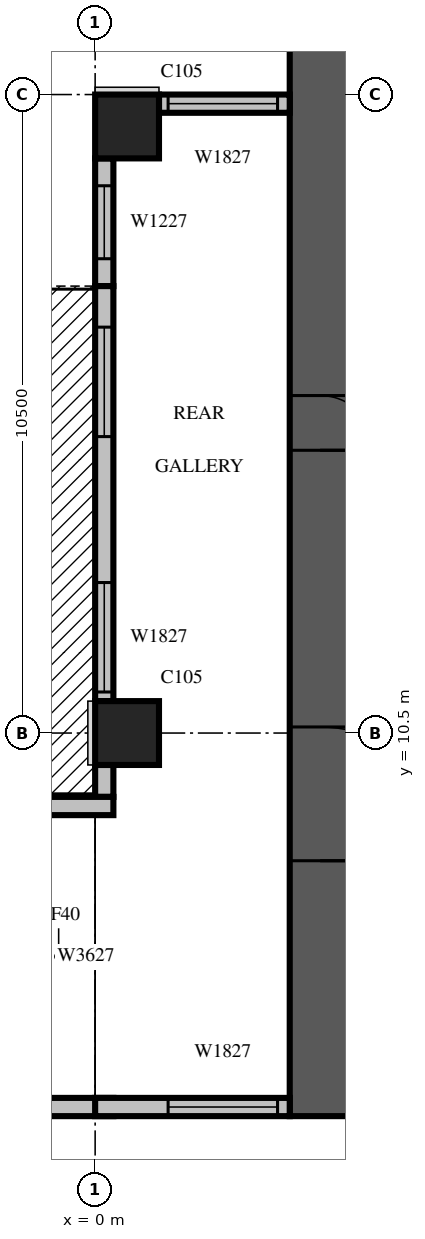
"""IFC4 building model, lengths in metres.
Left out: names, types, materials, properties, quantities, classifications, styles, units other than length and angle.
Written with IfcOpenShell. Run it as: python <this file> out.ifc"""

import sys

from ifc_helpers import new_model, si_unit, direction, frame, frame_2d, origin, origin_2d, place, context, subcontext, project, spatial, rectangle, extrude, source, transform, mapped, element, fill, save


model = new_model("IFC4")
c1 = context("Model", 3, precision=1e-05, world=origin(), true_north=direction((0.0, 1.0)))
c2 = subcontext(c1, "Body", "Model", "MODEL_VIEW")
j1 = project(units=[si_unit("LENGTHUNIT", "METRE"), si_unit("PLANEANGLEUNIT", "RADIAN")], contexts=[c1])
p1 = place(None, origin())
s1 = spatial("IfcSite", under=j1, at=p1, CompositionType="ELEMENT")
p2 = place(p1, origin())
s2 = spatial("IfcBuilding", under=s1, at=p2, CompositionType="ELEMENT")
p3 = place(p2, frame((0.0, 0.0, 128.7)))
s3 = spatial("IfcBuildingStorey", under=s2, at=p3, CompositionType="ELEMENT", Elevation=128.7)
m1 = source(origin(), c2, "Body", "SweptSolid", [
    extrude(rectangle(XDim=1.05, YDim=1.05, at=origin_2d()), origin(), (0.0, 0.0, 1.0), 4.2),
])
for number, where, z_axis, x_axis in (
    (1, (0.525, 10.5, 0.0), (0.0, 0.0, 1.0), (1.0, 0.0, 0.0)),
    (2, (0.525, 20.475, 0.0), (0.0, 0.0, 1.0), (1.0, 0.0, 0.0)),
):
    element("IfcColumn", number, at=place(p3, frame(where, z_axis=z_axis, x_axis=x_axis)), inside=s3, PredefinedType="COLUMN", context=c2, shape_type="MappedRepresentation", body=[
        mapped(m1, transform((0.0, 0.0, 0.0), scale=1.0)),
    ])
m2 = source(origin(), c2, "Body", "SweptSolid", [
    extrude(rectangle(XDim=17.8, YDim=1.0, at=frame_2d((8.9, 0.0))), origin(), (0.0, 0.0, 1.0), 4.2),
])
p4 = place(p3, frame((3.7, 4.2, 0.0), z_axis=(0.0, 0.0, 1.0), x_axis=(0.0, 1.0, 0.0)))
e3 = element("IfcWall", 3, at=p4, inside=s3, PredefinedType="SHEAR", context=c2, shape_type="MappedRepresentation", body=[
    mapped(m2, transform((0.0, 0.0, 0.0), scale=1.0)),
])
m3 = source(origin(), c2, "Body", "SweptSolid", [
    extrude(rectangle(XDim=2.2, YDim=2.1, at=frame_2d((1.1, 1.05))), frame((0.0, 0.51, 0.0), z_axis=(0.0, -1.0, 0.0), x_axis=(1.0, 0.0, 0.0)), (0.0, 0.0, 1.0), 1.02),
])
p5 = place(p4, frame((4.2, 0.0, 0.0)))
e4 = element("IfcOpeningElement", 4, at=p5, cuts=e3, PredefinedType="OPENING", context=c2, shape_type="MappedRepresentation", body=[
    mapped(m3, transform((0.0, 0.0, 0.0), scale=1.0)),
])
m4 = source(origin(), c2, "Body", "SweptSolid", [
    extrude(rectangle(XDim=0.9, YDim=2.1, at=frame_2d((0.45, 1.05))), frame((0.0, 0.51, 0.0), z_axis=(0.0, -1.0, 0.0), x_axis=(1.0, 0.0, 0.0)), (0.0, 0.0, 1.0), 1.02),
])
p6 = place(p4, frame((10.95, 0.0, 0.0)))
e5 = element("IfcOpeningElement", 5, at=p6, cuts=e3, PredefinedType="OPENING", context=c2, shape_type="MappedRepresentation", body=[
    mapped(m4, transform((0.0, 0.0, 0.0), scale=1.0)),
])
m5 = source(origin(), c2, "Body", "SweptSolid", [
    extrude(rectangle(XDim=2.15, YDim=0.3, at=frame_2d((1.075, 0.0))), origin(), (0.0, 0.0, 1.0), 3.8),
])
p7 = place(p3, frame((3.2, 20.85, 0.0), z_axis=(0.0, 0.0, 1.0), x_axis=(-1.0, 0.0, 0.0)))
e6 = element("IfcWall", 6, at=p7, inside=s3, PredefinedType="STANDARD", context=c2, shape_type="MappedRepresentation", body=[
    mapped(m5, transform((0.0, 0.0, 0.0), scale=1.0)),
])
m6 = source(origin(), c2, "Body", "SweptSolid", [
    extrude(rectangle(XDim=1.8, YDim=2.7, at=frame_2d((0.9, 1.35))), frame((0.0, 0.16, 0.0), z_axis=(0.0, -1.0, 0.0), x_axis=(1.0, 0.0, 0.0)), (0.0, 0.0, 1.0), 0.32),
])
p8 = place(p7, frame((0.2, 0.0, 0.6)))
e7 = element("IfcOpeningElement", 7, at=p8, cuts=e6, PredefinedType="OPENING", context=c2, shape_type="MappedRepresentation", body=[
    mapped(m6, transform((0.0, 0.0, 0.0), scale=1.0)),
])
m7 = source(origin(), c2, "Body", "SweptSolid", [
    extrude(rectangle(XDim=2.1, YDim=0.3, at=frame_2d((1.05, 0.0))), origin(), (0.0, 0.0, 1.0), 3.8),
])
p9 = place(p3, frame((0.15, 19.95, 0.0), z_axis=(0.0, 0.0, 1.0), x_axis=(0.0, -1.0, 0.0)))
e8 = element("IfcWall", 8, at=p9, inside=s3, PredefinedType="STANDARD", context=c2, shape_type="MappedRepresentation", body=[
    mapped(m7, transform((0.0, 0.0, 0.0), scale=1.0)),
])
m8 = source(origin(), c2, "Body", "SweptSolid", [
    extrude(rectangle(XDim=1.2, YDim=2.7, at=frame_2d((0.6, 1.35))), frame((0.0, 0.16, 0.0), z_axis=(0.0, -1.0, 0.0), x_axis=(1.0, 0.0, 0.0)), (0.0, 0.0, 1.0), 0.32),
])
p10 = place(p9, frame((0.45, 0.0, 0.6)))
e9 = element("IfcOpeningElement", 9, at=p10, cuts=e8, PredefinedType="OPENING", context=c2, shape_type="MappedRepresentation", body=[
    mapped(m8, transform((0.0, 0.0, 0.0), scale=1.0)),
])
m9 = source(origin(), c2, "Body", "SweptSolid", [
    extrude(rectangle(XDim=6.825, YDim=0.3, at=frame_2d((3.413, 0.0))), origin(), (0.0, 0.0, 1.0), 3.8),
])
p11 = place(p3, frame((0.15, 17.85, 0.0), z_axis=(0.0, 0.0, 1.0), x_axis=(0.0, -1.0, 0.0)))
e10 = element("IfcWall", 10, at=p11, inside=s3, PredefinedType="STANDARD", context=c2, shape_type="MappedRepresentation", body=[
    mapped(m9, transform((0.0, 0.0, 0.0), scale=1.0)),
])
m10 = source(origin(), c2, "Body", "SweptSolid", [
    extrude(rectangle(XDim=1.8, YDim=2.4, at=frame_2d((0.9, 1.2))), frame((0.0, 0.16, 0.0), z_axis=(0.0, -1.0, 0.0), x_axis=(1.0, 0.0, 0.0)), (0.0, 0.0, 1.0), 0.32),
])
p12 = place(p11, frame((0.675, 0.0, 0.0)))
e11 = element("IfcOpeningElement", 11, at=p12, cuts=e10, PredefinedType="OPENING", context=c2, shape_type="MappedRepresentation", body=[
    mapped(m10, transform((0.0, 0.0, 0.0), scale=1.0)),
])
p13 = place(p11, frame((4.875, 0.0, 0.6)))
e12 = element("IfcOpeningElement", 12, at=p13, cuts=e10, PredefinedType="OPENING", context=c2, shape_type="MappedRepresentation", body=[
    mapped(m6, transform((0.0, 0.0, 0.0), scale=1.0)),
])
m11 = source(origin(), c2, "Body", "SweptSolid", [
    extrude(rectangle(XDim=0.525, YDim=0.3, at=frame_2d((0.263, 0.0))), origin(), (0.0, 0.0, 1.0), 3.8),
])
p14 = place(p3, frame((0.15, 9.975, 0.0), z_axis=(0.0, 0.0, 1.0), x_axis=(0.0, -1.0, 0.0)))
e13 = element("IfcWall", 13, at=p14, inside=s3, PredefinedType="STANDARD", context=c2, shape_type="MappedRepresentation", body=[
    mapped(m11, transform((0.0, 0.0, 0.0), scale=1.0)),
])
m12 = source(origin(), c2, "Body", "SweptSolid", [
    extrude(rectangle(XDim=1.2, YDim=0.3, at=frame_2d((0.6, 0.0))), origin(), (0.0, 0.0, 1.0), 3.8),
])
for number, where, z_axis, x_axis in (
    (14, (0.3, 9.3, 0.0), (0.0, 0.0, 1.0), (-1.0, 0.0, 0.0)),
    (15, (0.3, 4.35, 0.0), (0.0, 0.0, 1.0), (-1.0, 0.0, 0.0)),
):
    element("IfcWall", number, at=place(p3, frame(where, z_axis=z_axis, x_axis=x_axis)), inside=s3, PredefinedType="STANDARD", context=c2, shape_type="MappedRepresentation", body=[
        mapped(m12, transform((0.0, 0.0, 0.0), scale=1.0)),
    ])
m13 = source(origin(), c2, "Body", "SweptSolid", [
    extrude(rectangle(XDim=3.2, YDim=0.3, at=frame_2d((1.6, 0.0))), origin(), (0.0, 0.0, 1.0), 3.8),
])
p15 = place(p3, frame((0.0, 4.35, 0.0), z_axis=(0.0, 0.0, 1.0), x_axis=(1.0, 0.0, 0.0)))
e16 = element("IfcWall", 16, at=p15, inside=s3, PredefinedType="STANDARD", context=c2, shape_type="MappedRepresentation", body=[
    mapped(m13, transform((0.0, 0.0, 0.0), scale=1.0)),
])
p16 = place(p15, frame((1.2, 0.0, 0.6)))
e17 = element("IfcOpeningElement", 17, at=p16, cuts=e16, PredefinedType="OPENING", context=c2, shape_type="MappedRepresentation", body=[
    mapped(m6, transform((0.0, 0.0, 0.0), scale=1.0)),
])
m14 = source(origin(), c2, "Body", "SweptSolid", [
    extrude(rectangle(XDim=1.8, YDim=2.7, at=frame_2d((0.9, 1.35))), frame((0.0, 0.03, 0.0), z_axis=(0.0, -1.0, 0.0), x_axis=(1.0, 0.0, 0.0)), (0.0, 0.0, 1.0), 0.06),
])
p17 = place(p8, origin())
e18 = element("IfcWindow", 18, at=p17, inside=s3, PartitioningType="SINGLE_PANEL", PredefinedType="WINDOW", context=c2, shape_type="MappedRepresentation", body=[
    mapped(m14, transform((0.0, 0.0, 0.0), scale=1.0)),
])
fill(e7, e18)
m15 = source(origin(), c2, "Body", "SweptSolid", [
    extrude(rectangle(XDim=1.2, YDim=2.7, at=frame_2d((0.6, 1.35))), frame((0.0, 0.03, 0.0), z_axis=(0.0, -1.0, 0.0), x_axis=(1.0, 0.0, 0.0)), (0.0, 0.0, 1.0), 0.06),
])
p18 = place(p10, origin())
e19 = element("IfcWindow", 19, at=p18, inside=s3, PartitioningType="SINGLE_PANEL", PredefinedType="WINDOW", context=c2, shape_type="MappedRepresentation", body=[
    mapped(m15, transform((0.0, 0.0, 0.0), scale=1.0)),
])
fill(e9, e19)
m16 = source(origin(), c2, "Body", "SweptSolid", [
    extrude(rectangle(XDim=1.8, YDim=2.4, at=frame_2d((0.9, 1.2))), frame((0.0, 0.025, 0.0), z_axis=(0.0, -1.0, 0.0), x_axis=(1.0, 0.0, 0.0)), (0.0, 0.0, 1.0), 0.05),
])
p19 = place(p12, origin())
e20 = element("IfcDoor", 20, at=p19, inside=s3, OperationType="SLIDING_TO_LEFT", PredefinedType="DOOR", context=c2, shape_type="MappedRepresentation", body=[
    mapped(m16, transform((0.0, 0.0, 0.0), scale=1.0)),
])
fill(e11, e20)
p20 = place(p13, origin())
e21 = element("IfcWindow", 21, at=p20, inside=s3, PartitioningType="SINGLE_PANEL", PredefinedType="WINDOW", context=c2, shape_type="MappedRepresentation", body=[
    mapped(m14, transform((0.0, 0.0, 0.0), scale=1.0)),
])
fill(e12, e21)
p21 = place(p16, origin())
e22 = element("IfcWindow", 22, at=p21, inside=s3, PartitioningType="SINGLE_PANEL", PredefinedType="WINDOW", context=c2, shape_type="MappedRepresentation", body=[
    mapped(m14, transform((0.0, 0.0, 0.0), scale=1.0)),
])
fill(e17, e22)
m17 = source(origin(), c2, "Body", "SweptSolid", [
    extrude(rectangle(XDim=2.2, YDim=2.1, at=frame_2d((1.1, 1.05))), frame((0.0, 0.025, 0.0), z_axis=(0.0, -1.0, 0.0), x_axis=(1.0, 0.0, 0.0)), (0.0, 0.0, 1.0), 0.05),
])
p22 = place(p5, origin())
e23 = element("IfcDoor", 23, at=p22, inside=s3, OperationType="DOUBLE_DOOR_SINGLE_SWING", PredefinedType="DOOR", context=c2, shape_type="MappedRepresentation", body=[
    mapped(m17, transform((0.0, 0.0, 0.0), scale=1.0)),
])
fill(e4, e23)
m18 = source(origin(), c2, "Body", "SweptSolid", [
    extrude(rectangle(XDim=0.9, YDim=2.1, at=frame_2d((0.45, 1.05))), frame((0.0, 0.025, 0.0), z_axis=(0.0, -1.0, 0.0), x_axis=(1.0, 0.0, 0.0)), (0.0, 0.0, 1.0), 0.05),
])
p23 = place(p6, origin())
e24 = element("IfcDoor", 24, at=p23, inside=s3, OperationType="SINGLE_SWING_RIGHT", PredefinedType="DOOR", context=c2, shape_type="MappedRepresentation", body=[
    mapped(m18, transform((0.0, 0.0, 0.0), scale=1.0)),
])
fill(e5, e24)
save(model, sys.argv[1])
